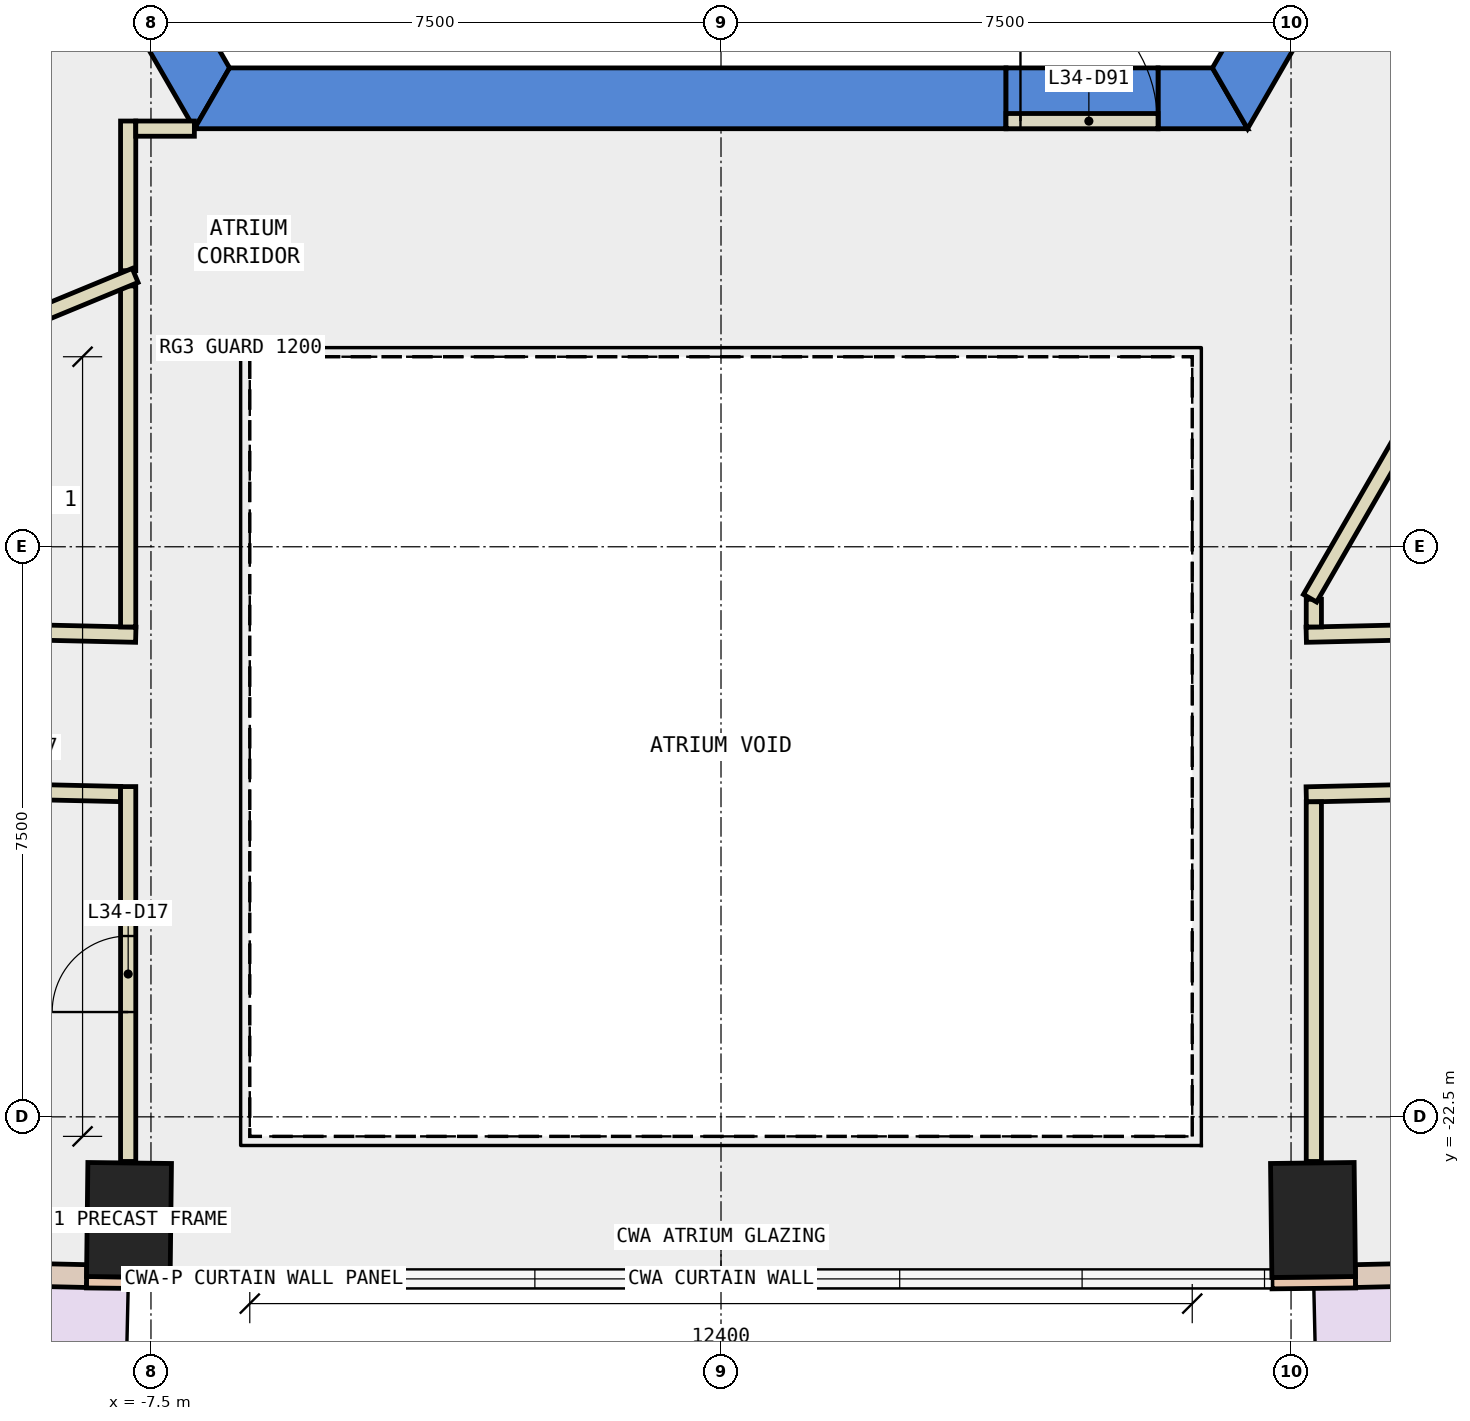
"""IFC4 building model, lengths in metres.
Left out: names, types, materials, properties, quantities, classifications, styles, units other than length and angle.
Written with IfcOpenShell. Run it as: python <this file> out.ifc"""

import sys

from ifc_helpers import new_model, si_unit, direction, frame, frame_2d, origin, origin_2d, place, context, subcontext, project, spatial, polyline, rectangle, outline, extrude, element, fill, save


model = new_model("IFC4")
c1 = context("Model", 3, precision=1e-05, world=origin(), true_north=direction((0.0, 1.0)))
c2 = subcontext(c1, "Body", "Model", "MODEL_VIEW")
j1 = project(units=[si_unit("LENGTHUNIT", "METRE"), si_unit("PLANEANGLEUNIT", "RADIAN")], contexts=[c1])
p1 = place(None, origin())
s1 = spatial("IfcSite", under=j1, at=p1, CompositionType="ELEMENT")
p2 = place(p1, origin())
s2 = spatial("IfcBuilding", under=s1, at=p2, CompositionType="ELEMENT")
p3 = place(p2, frame((0.0, 0.0, 155.0)))
s3 = spatial("IfcBuildingStorey", under=s2, at=p3, CompositionType="ELEMENT", Elevation=155.0)
for number, where, z_axis, x_axis in (
    (1, (-7.789, -23.857, -0.4), (0.0, 0.0, 1.0), (-1.0, 0.012, 0.0)),
    (2, (7.789, -23.857, -0.4), (0.0, 0.0, 1.0), (1.0, 0.012, 0.0)),
):
    element("IfcColumn", number, at=place(p3, frame(where, z_axis=z_axis, x_axis=x_axis)), inside=s3, PredefinedType="COLUMN", context=c2, shape_type="SweptSolid", body=[
        extrude(rectangle(XDim=1.1, YDim=1.5, at=origin_2d()), origin(), (0.0, 0.0, 1.0), 4.2),
    ])
p4 = place(p3, frame((0.0, 0.0, -0.4)))
e3 = element("IfcWall", 3, at=p4, inside=s3, PredefinedType="SHEAR", context=c2, shape_type="SweptSolid", body=[
    extrude(outline(polyline([(-13.856, 2.5), (-6.928, -9.5), (-6.466, -8.7), (-12.933, 2.5), (-13.856, 2.5)])), origin(), (0.0, 0.0, 1.0), 4.2),
])
p5 = place(p3, frame((0.0, 0.0, -0.4)))
e4 = element("IfcWall", 4, at=p5, inside=s3, PredefinedType="SHEAR", context=c2, shape_type="SweptSolid", body=[
    extrude(outline(polyline([(3.75, -9.5), (3.75, -8.7), (-6.466, -8.7), (-6.928, -9.5), (3.75, -9.5)])), origin(), (0.0, 0.0, 1.0), 4.2),
])
p6 = place(p3, frame((0.0, 0.0, -0.4)))
e5 = element("IfcWall", 5, at=p6, inside=s3, PredefinedType="SHEAR", context=c2, shape_type="SweptSolid", body=[
    extrude(outline(polyline([(5.75, -8.7), (5.75, -9.5), (6.928, -9.5), (6.466, -8.7), (5.75, -8.7)])), origin(), (0.0, 0.0, 1.0), 4.2),
])
p7 = place(p3, frame((0.0, 0.0, 3.6)))
e6 = element("IfcWall", 6, at=p7, inside=s3, PredefinedType="SHEAR", context=c2, shape_type="SweptSolid", body=[
    extrude(outline(polyline([(5.75, -9.5), (5.75, -8.7), (3.75, -8.7), (3.75, -9.5), (5.75, -9.5)])), origin(), (0.0, 0.0, 1.0), 0.2),
])
p8 = place(p3, frame((0.0, 0.0, -0.4)))
e7 = element("IfcWall", 7, at=p8, inside=s3, PredefinedType="SHEAR", context=c2, shape_type="SweptSolid", body=[
    extrude(outline(polyline([(8.117, -7.44), (7.424, -7.04), (6.466, -8.7), (6.928, -9.5), (8.117, -7.44)])), origin(), (0.0, 0.0, 1.0), 4.2),
])
for number, where, z_axis, x_axis in (
    (8, (-8.349, -24.676, 0.0), (0.0, 0.0, 1.0), (1.0, -0.011, 0.0)),
    (9, (7.249, -24.688, 0.0), (0.0, 0.0, 1.0), (1.0, 0.011, 0.0)),
):
    element("IfcWall", number, at=place(p3, frame(where, z_axis=z_axis, x_axis=x_axis)), inside=s3, PredefinedType="STANDARD", context=c2, shape_type="SweptSolid", body=[
        extrude(rectangle(XDim=1.1, YDim=0.15, at=frame_2d((0.55, 0.0))), origin(), (0.0, 0.0, 1.0), 3.8),
    ])
p9 = place(p3, frame((-15.68, -24.429, 0.0), z_axis=(0.0, 0.0, 1.0), x_axis=(0.999743825009, -0.022633699594, 0.0)))
e10 = element("IfcWall", 10, at=p9, inside=s3, PredefinedType="STANDARD", context=c2, shape_type="SweptSolid", body=[
    extrude(rectangle(XDim=7.335, YDim=0.3, at=frame_2d((3.667, 0.0))), origin(), (0.0, 0.0, 1.0), 3.8),
])
p10 = place(p9, frame((0.834, 0.0, 0.0)))
e11 = element("IfcOpeningElement", 11, at=p10, cuts=e10, PredefinedType="OPENING", context=c2, shape_type="SweptSolid", body=[
    extrude(rectangle(XDim=2.0, YDim=2.4, at=frame_2d((1.0, 1.2))), frame((0.0, 0.16, 0.0), z_axis=(0.0, -1.0, 0.0), x_axis=(1.0, 0.0, 0.0)), (0.0, 0.0, 1.0), 0.32),
])
p11 = place(p9, frame((4.301, 0.0, 0.9)))
e12 = element("IfcOpeningElement", 12, at=p11, cuts=e10, PredefinedType="OPENING", context=c2, shape_type="SweptSolid", body=[
    extrude(rectangle(XDim=2.4, YDim=2.6, at=frame_2d((1.2, 1.3))), frame((0.0, 0.16, 0.0), z_axis=(0.0, -1.0, 0.0), x_axis=(1.0, 0.0, 0.0)), (0.0, 0.0, 1.0), 0.32),
])
p12 = place(p3, frame((8.347, -24.595, 0.0), z_axis=(0.0, 0.0, 1.0), x_axis=(0.999743825009, 0.022633699594, 0.0)))
e13 = element("IfcWall", 13, at=p12, inside=s3, PredefinedType="STANDARD", context=c2, shape_type="SweptSolid", body=[
    extrude(rectangle(XDim=7.335, YDim=0.3, at=frame_2d((3.667, 0.0))), origin(), (0.0, 0.0, 1.0), 3.8),
])
p13 = place(p12, frame((0.834, 0.0, 0.0)))
e14 = element("IfcOpeningElement", 14, at=p13, cuts=e13, PredefinedType="OPENING", context=c2, shape_type="SweptSolid", body=[
    extrude(rectangle(XDim=2.0, YDim=2.4, at=frame_2d((1.0, 1.2))), frame((0.0, 0.16, 0.0), z_axis=(0.0, -1.0, 0.0), x_axis=(1.0, 0.0, 0.0)), (0.0, 0.0, 1.0), 0.32),
])
p14 = place(p12, frame((4.301, 0.0, 0.9)))
e15 = element("IfcOpeningElement", 15, at=p14, cuts=e13, PredefinedType="OPENING", context=c2, shape_type="SweptSolid", body=[
    extrude(rectangle(XDim=2.4, YDim=2.6, at=frame_2d((1.2, 1.3))), frame((0.0, 0.16, 0.0), z_axis=(0.0, -1.0, 0.0), x_axis=(1.0, 0.0, 0.0)), (0.0, 0.0, 1.0), 0.32),
])
p15 = place(p3, frame((7.7, -16.157, 0.0), z_axis=(0.0, 0.0, 1.0), x_axis=(0.999744539931, 0.022602098978, 0.0)))
e16 = element("IfcWall", 16, at=p15, inside=s3, PredefinedType="PARTITIONING", context=c2, shape_type="SweptSolid", body=[
    extrude(rectangle(XDim=8.274, YDim=0.2, at=frame_2d((4.137, 0.0))), origin(), (0.0, 0.0, 1.0), 3.8),
])
p16 = place(p15, frame((3.237, 0.0, 0.0)))
e17 = element("IfcOpeningElement", 17, at=p16, cuts=e16, PredefinedType="OPENING", context=c2, shape_type="SweptSolid", body=[
    extrude(rectangle(XDim=1.8, YDim=2.1, at=frame_2d((0.9, 1.05))), frame((0.0, 0.11, 0.0), z_axis=(0.0, -1.0, 0.0), x_axis=(1.0, 0.0, 0.0)), (0.0, 0.0, 1.0), 0.22),
])
p17 = place(p3, frame((-14.356, -16.006, 0.0), z_axis=(0.0, 0.0, 1.0), x_axis=(0.999743177933, -0.022662263286, 0.0)))
e18 = element("IfcWall", 18, at=p17, inside=s3, PredefinedType="PARTITIONING", context=c2, shape_type="SweptSolid", body=[
    extrude(rectangle(XDim=6.658, YDim=0.2, at=frame_2d((3.329, 0.0))), origin(), (0.0, 0.0, 1.0), 3.8),
])
p18 = place(p17, frame((2.829, 0.0, 0.0)))
e19 = element("IfcOpeningElement", 19, at=p18, cuts=e18, PredefinedType="OPENING", context=c2, shape_type="SweptSolid", body=[
    extrude(rectangle(XDim=1.0, YDim=2.1, at=frame_2d((0.5, 1.05))), frame((0.0, 0.11, 0.0), z_axis=(0.0, -1.0, 0.0), x_axis=(1.0, 0.0, 0.0)), (0.0, 0.0, 1.0), 0.22),
])
p19 = place(p3, frame((16.111, -18.067, 0.0), z_axis=(0.0, 0.0, 1.0), x_axis=(-0.999741835545, -0.022721405353, 0.0)))
e20 = element("IfcWall", 20, at=p19, inside=s3, PredefinedType="PARTITIONING", context=c2, shape_type="SweptSolid", body=[
    extrude(rectangle(XDim=8.413, YDim=0.2, at=frame_2d((4.207, 0.0))), origin(), (0.0, 0.0, 1.0), 3.8),
])
p20 = place(p19, frame((3.706, 0.0, 0.0)))
e21 = element("IfcOpeningElement", 21, at=p20, cuts=e20, PredefinedType="OPENING", context=c2, shape_type="SweptSolid", body=[
    extrude(rectangle(XDim=1.0, YDim=2.1, at=frame_2d((0.5, 1.05))), frame((0.0, 0.11, 0.0), z_axis=(0.0, -1.0, 0.0), x_axis=(1.0, 0.0, 0.0)), (0.0, 0.0, 1.0), 0.22),
])
p21 = place(p3, frame((-7.9, -18.253, 0.0), z_axis=(0.0, 0.0, 1.0), x_axis=(-0.999745510411, 0.022559131487, 0.0)))
e22 = element("IfcWall", 22, at=p21, inside=s3, PredefinedType="PARTITIONING", context=c2, shape_type="SweptSolid", body=[
    extrude(rectangle(XDim=3.896, YDim=0.2, at=frame_2d((1.948, 0.0))), origin(), (0.0, 0.0, 1.0), 3.8),
])
p22 = place(p3, frame((7.8, -15.69, 0.0), z_axis=(0.0, 0.0, 1.0), x_axis=(0.0, -1.0, 0.0)))
e23 = element("IfcWall", 23, at=p22, inside=s3, PredefinedType="PARTITIONING", context=c2, shape_type="SweptSolid", body=[
    extrude(rectangle(XDim=0.365, YDim=0.2, at=frame_2d((0.183, 0.0))), origin(), (0.0, 0.0, 1.0), 3.8),
])
p23 = place(p3, frame((-7.8, -11.368, 0.0), z_axis=(0.0, 0.0, 1.0), x_axis=(0.0, 1.0, 0.0)))
e24 = element("IfcWall", 24, at=p23, inside=s3, PredefinedType="PARTITIONING", context=c2, shape_type="SweptSolid", body=[
    extrude(rectangle(XDim=1.969, YDim=0.2, at=frame_2d((0.984, 0.0))), origin(), (0.0, 0.0, 1.0), 3.8),
])
p24 = place(p3, frame((-7.7, -9.499, 0.0), z_axis=(0.0, 0.0, 1.0), x_axis=(1.0, 0.0, 0.0)))
e25 = element("IfcWall", 25, at=p24, inside=s3, PredefinedType="PARTITIONING", context=c2, shape_type="SweptSolid", body=[
    extrude(rectangle(XDim=0.771, YDim=0.2, at=frame_2d((0.385, 0.0))), origin(), (0.0, 0.0, 1.0), 3.8),
])
p25 = place(p3, frame((-7.8, -16.055, 0.0), z_axis=(0.0, 0.0, 1.0), x_axis=(0.0, 1.0, 0.0)))
e26 = element("IfcWall", 26, at=p25, inside=s3, PredefinedType="PARTITIONING", context=c2, shape_type="SweptSolid", body=[
    extrude(rectangle(XDim=4.487, YDim=0.2, at=frame_2d((2.243, 0.0))), origin(), (0.0, 0.0, 1.0), 3.8),
])
p26 = place(p3, frame((7.8, -18.355, 0.0), z_axis=(0.0, 0.0, 1.0), x_axis=(0.0, -1.0, 0.0)))
e27 = element("IfcWall", 27, at=p26, inside=s3, PredefinedType="PARTITIONING", context=c2, shape_type="SweptSolid", body=[
    extrude(rectangle(XDim=4.732, YDim=0.2, at=frame_2d((2.366, 0.0))), origin(), (0.0, 0.0, 1.0), 3.8),
])
p27 = place(p3, frame((-7.8, -23.087, 0.0), z_axis=(0.0, 0.0, 1.0), x_axis=(0.0, 1.0, 0.0)))
e28 = element("IfcWall", 28, at=p27, inside=s3, PredefinedType="PARTITIONING", context=c2, shape_type="SweptSolid", body=[
    extrude(rectangle(XDim=4.932, YDim=0.2, at=frame_2d((2.466, 0.0))), origin(), (0.0, 0.0, 1.0), 3.8),
])
p28 = place(p27, frame((1.966, 0.0, 0.0)))
e29 = element("IfcOpeningElement", 29, at=p28, cuts=e28, PredefinedType="OPENING", context=c2, shape_type="SweptSolid", body=[
    extrude(rectangle(XDim=1.0, YDim=2.1, at=frame_2d((0.5, 1.05))), frame((0.0, 0.11, 0.0), z_axis=(0.0, -1.0, 0.0), x_axis=(1.0, 0.0, 0.0)), (0.0, 0.0, 1.0), 0.22),
])
p29 = place(p3, frame((-7.708, -11.43, 0.0), z_axis=(0.0, 0.0, 1.0), x_axis=(-0.924285151797, -0.381702709144, 0.0)))
e30 = element("IfcWall", 30, at=p29, inside=s3, PredefinedType="PARTITIONING", context=c2, shape_type="SweptSolid", body=[
    extrude(rectangle(XDim=8.129, YDim=0.2, at=frame_2d((4.065, 0.0))), origin(), (0.0, 0.0, 1.0), 3.8),
])
p30 = place(p3, frame((3.75, -9.4, 0.0), z_axis=(0.0, 0.0, 1.0), x_axis=(1.0, 0.0, 0.0)))
e31 = element("IfcWall", 31, at=p30, inside=s3, PredefinedType="PARTITIONING", context=c2, shape_type="SweptSolid", body=[
    extrude(rectangle(XDim=2.0, YDim=0.2, at=frame_2d((1.0, 0.0))), origin(), (0.0, 0.0, 1.0), 2.4),
])
p31 = place(p30, frame((0.19, 0.0, 0.0)))
e32 = element("IfcOpeningElement", 32, at=p31, cuts=e31, PredefinedType="OPENING", context=c2, shape_type="SweptSolid", body=[
    extrude(rectangle(XDim=1.8, YDim=2.1, at=frame_2d((0.9, 1.05))), frame((0.0, 0.11, 0.0), z_axis=(0.0, -1.0, 0.0), x_axis=(1.0, 0.0, 0.0)), (0.0, 0.0, 1.0), 0.22),
])
p32 = place(p3, frame((12.401, -7.621, 0.0), z_axis=(0.0, 0.0, 1.0), x_axis=(-0.499983724212, -0.866034800411, 0.0)))
e33 = element("IfcWall", 33, at=p32, inside=s3, PredefinedType="PARTITIONING", context=c2, shape_type="SweptSolid", body=[
    extrude(rectangle(XDim=9.302, YDim=0.2, at=frame_2d((4.651, 0.0))), origin(), (0.0, 0.0, 1.0), 3.8),
])
p33 = place(p28, origin())
e34 = element("IfcDoor", 34, at=p33, inside=s3, OperationType="SINGLE_SWING_LEFT", PredefinedType="DOOR", context=c2, shape_type="SweptSolid", body=[
    extrude(rectangle(XDim=1.0, YDim=2.1, at=frame_2d((0.5, 1.05))), frame((0.0, 0.025, 0.0), z_axis=(0.0, -1.0, 0.0), x_axis=(1.0, 0.0, 0.0)), (0.0, 0.0, 1.0), 0.05),
])
fill(e29, e34)
p34 = place(p31, origin())
e35 = element("IfcDoor", 35, at=p34, inside=s3, OperationType="DOUBLE_DOOR_SINGLE_SWING", PredefinedType="DOOR", context=c2, shape_type="SweptSolid", body=[
    extrude(rectangle(XDim=1.8, YDim=2.1, at=frame_2d((0.9, 1.05))), frame((0.0, 0.025, 0.0), z_axis=(0.0, -1.0, 0.0), x_axis=(1.0, 0.0, 0.0)), (0.0, 0.0, 1.0), 0.05),
])
fill(e32, e35)
save(model, sys.argv[1])
